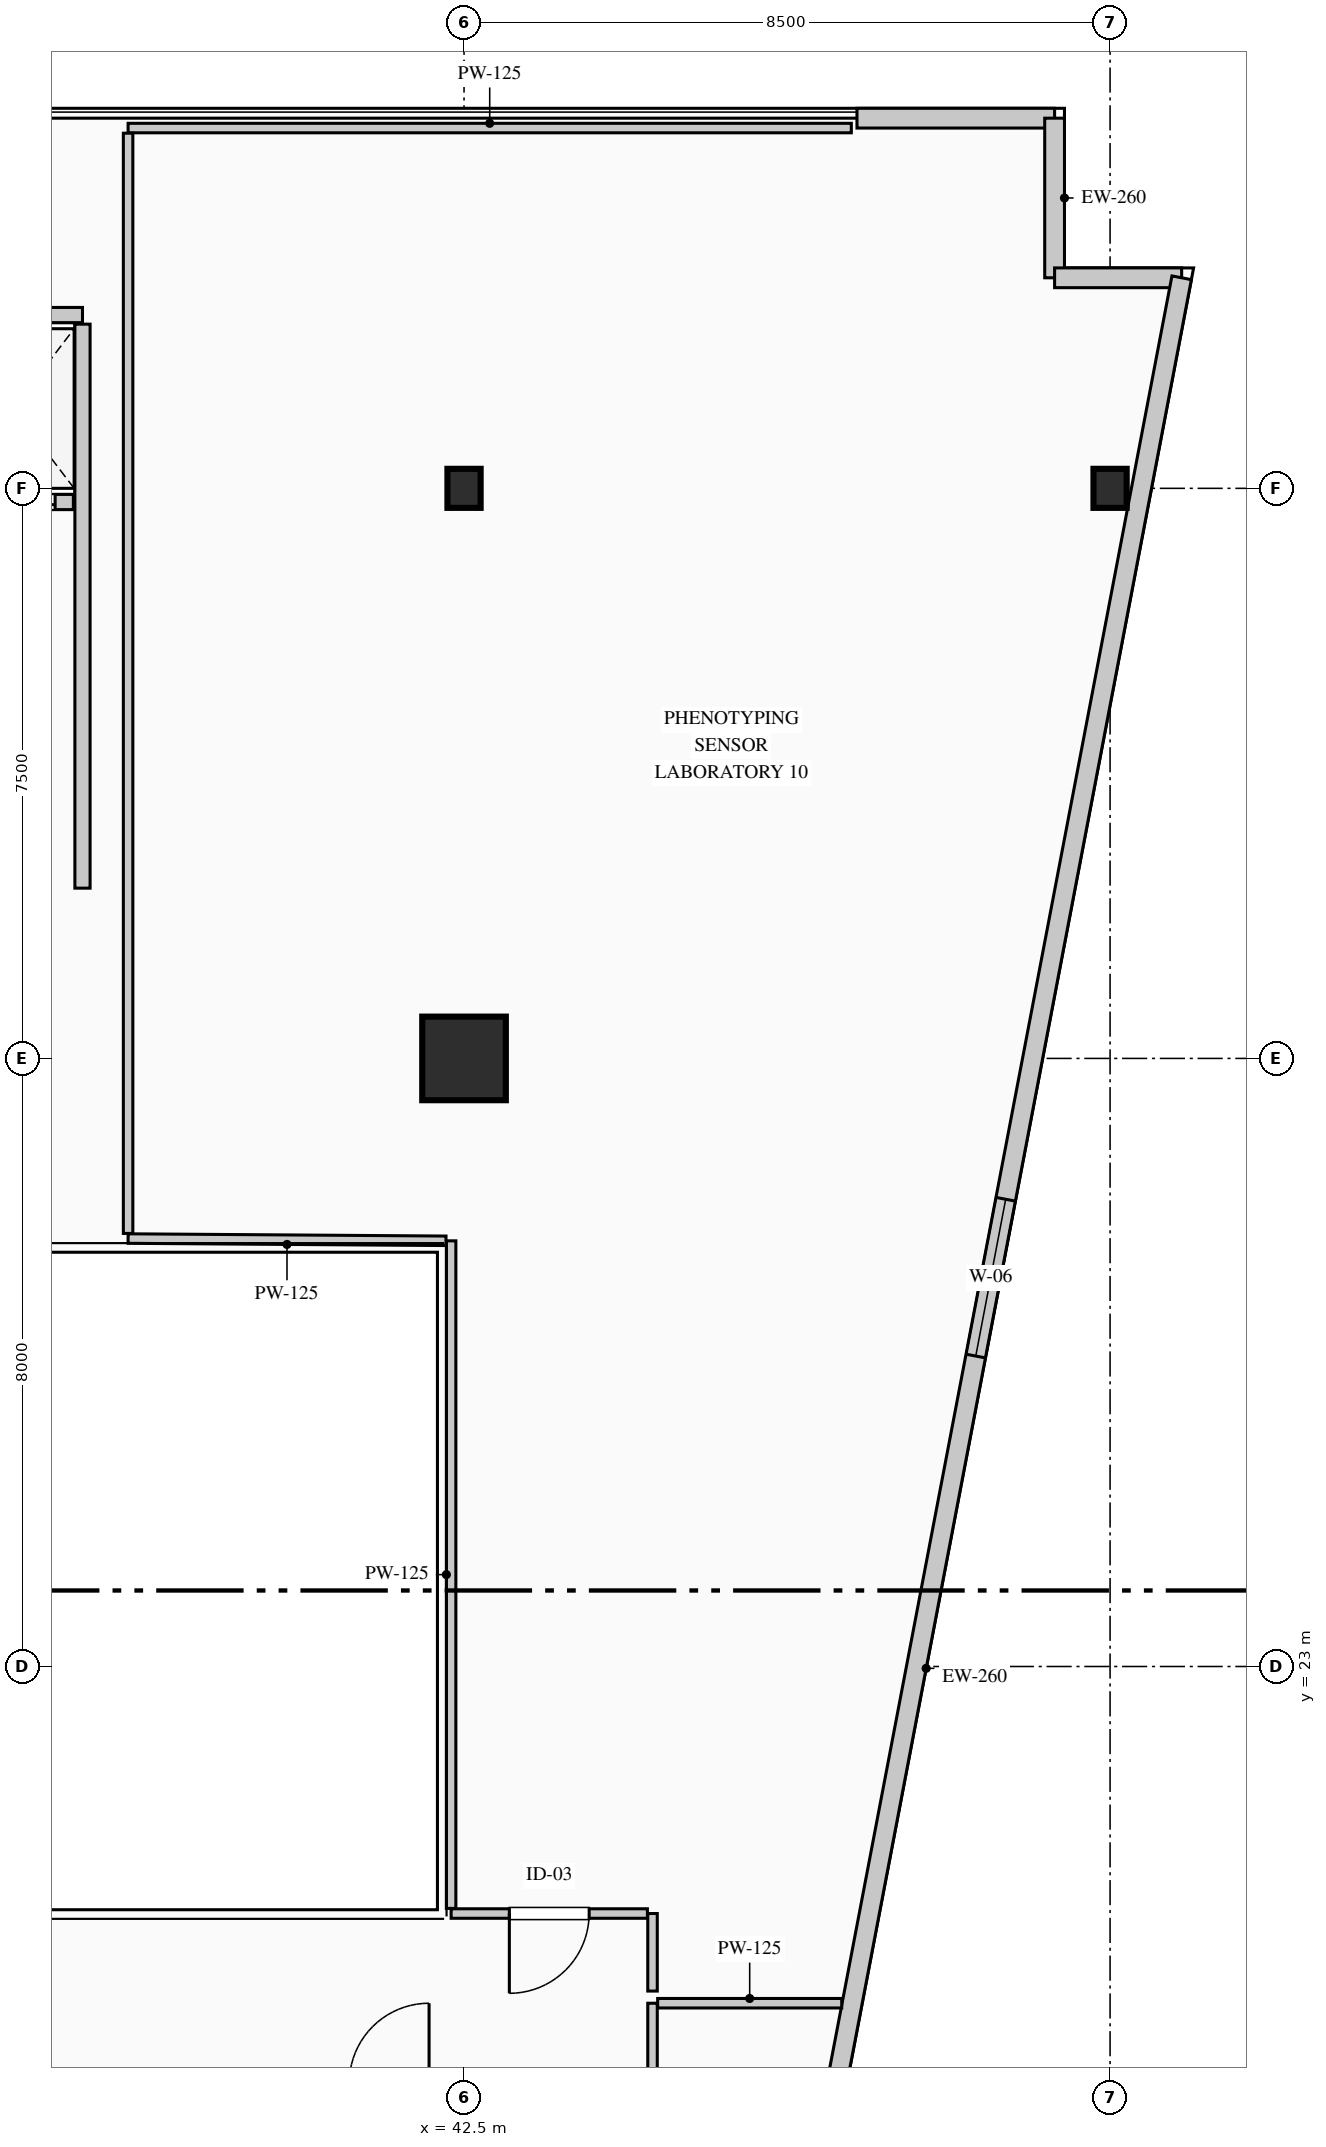
"""IFC4 building model, lengths in metres.
Left out: names, types, materials, properties, quantities, classifications, styles, units other than length and angle.
Written with IfcOpenShell. Run it as: python <this file> out.ifc"""

import sys

from ifc_helpers import new_model, si_unit, direction, frame, frame_2d, origin, origin_2d, place, context, subcontext, project, spatial, rectangle, i_section, extrude, element, fill, save


model = new_model("IFC4")
c1 = context("Model", 3, precision=1e-05, world=origin(), true_north=direction((0.0, 1.0)))
c2 = subcontext(c1, "Body", "Model", "MODEL_VIEW")
j1 = project(units=[si_unit("LENGTHUNIT", "METRE"), si_unit("PLANEANGLEUNIT", "RADIAN")], contexts=[c1])
p1 = place(None, origin())
s1 = spatial("IfcSite", under=j1, at=p1, CompositionType="ELEMENT")
p2 = place(p1, origin())
s2 = spatial("IfcBuilding", under=s1, at=p2, CompositionType="ELEMENT")
p3 = place(p2, frame((0.0, 0.0, 115.35)))
s3 = spatial("IfcBuildingStorey", under=s2, at=p3, CompositionType="ELEMENT", Elevation=115.35)
p4 = place(p3, frame((42.5, 31.0, 0.0), z_axis=(0.0, 0.0, 1.0), x_axis=(1.0, 0.0, 0.0)))
e1 = element("IfcColumn", 1, at=p4, inside=s3, PredefinedType="COLUMN", context=c2, shape_type="SweptSolid", body=[
    extrude(rectangle(XDim=1.1, YDim=1.1, at=origin_2d()), origin(), (0.0, 0.0, 1.0), 3.95),
])
for number, where, z_axis, x_axis in (
    (2, (42.5, 38.5, 0.0), (0.0, 0.0, 1.0), (1.0, 0.0, 0.0)),
    (3, (51.0, 38.5, 0.0), (0.0, 0.0, 1.0), (1.0, 0.0, 0.0)),
):
    element("IfcColumn", number, at=place(p3, frame(where, z_axis=z_axis, x_axis=x_axis)), inside=s3, PredefinedType="COLUMN", context=c2, shape_type="SweptSolid", body=[
        extrude(i_section(OverallWidth=0.437, OverallDepth=0.514, WebThickness=0.061, FlangeThickness=0.077, FilletRadius=0.015, at=origin_2d()), origin(), (0.0, 0.0, 1.0), 3.95),
    ])
p5 = place(p3, frame((47.67, 43.37, 0.0), z_axis=(0.0, 0.0, 1.0), x_axis=(1.0, 0.0, 0.0)))
e4 = element("IfcWall", 4, at=p5, inside=s3, PredefinedType="STANDARD", context=c2, shape_type="SweptSolid", body=[
    extrude(rectangle(XDim=2.6, YDim=0.26, at=frame_2d((1.3, 0.0))), origin(), (0.0, 0.0, 1.0), 3.69),
])
p6 = place(p3, frame((50.27, 43.37, 0.0), z_axis=(0.0, 0.0, 1.0), x_axis=(0.0, -1.0, 0.0)))
e5 = element("IfcWall", 5, at=p6, inside=s3, PredefinedType="STANDARD", context=c2, shape_type="SweptSolid", body=[
    extrude(rectangle(XDim=2.1, YDim=0.26, at=frame_2d((1.05, 0.0))), origin(), (0.0, 0.0, 1.0), 3.69),
])
p7 = place(p3, frame((50.27, 41.27, 0.0), z_axis=(0.0, 0.0, 1.0), x_axis=(1.0, 0.0, 0.0)))
e6 = element("IfcWall", 6, at=p7, inside=s3, PredefinedType="STANDARD", context=c2, shape_type="SweptSolid", body=[
    extrude(rectangle(XDim=1.672, YDim=0.26, at=frame_2d((0.836, 0.0))), origin(), (0.0, 0.0, 1.0), 3.69),
])
p8 = place(p3, frame((51.942, 41.27, 0.0), z_axis=(0.0, 0.0, 1.0), x_axis=(-0.187592192405, -0.982247000173, 0.0)))
e7 = element("IfcWall", 7, at=p8, inside=s3, PredefinedType="STANDARD", context=c2, shape_type="SweptSolid", body=[
    extrude(rectangle(XDim=37.2, YDim=0.26, at=frame_2d((18.6, 0.0))), origin(), (0.0, 0.0, 1.0), 3.69),
])
p9 = place(p8, frame((12.342, 0.0, 0.9)))
e8 = element("IfcOpeningElement", 8, at=p9, cuts=e7, PredefinedType="OPENING", context=c2, shape_type="SweptSolid", body=[
    extrude(rectangle(XDim=2.1, YDim=2.0, at=frame_2d((1.05, 1.0))), frame((0.0, 0.14, 0.0), z_axis=(0.0, -1.0, 0.0), x_axis=(1.0, 0.0, 0.0)), (0.0, 0.0, 1.0), 0.28),
])
p10 = place(p3, frame((30.5, 40.78, 0.0), z_axis=(0.0, 0.0, 1.0), x_axis=(1.0, 0.0, 0.0)))
e9 = element("IfcWall", 9, at=p10, inside=s3, PredefinedType="PARTITIONING", context=c2, shape_type="SweptSolid", body=[
    extrude(rectangle(XDim=6.98, YDim=0.2, at=frame_2d((3.49, 0.0))), origin(), (0.0, 0.0, 1.0), 3.69),
])
p11 = place(p3, frame((37.48, 33.24, 0.0), z_axis=(0.0, 0.0, 1.0), x_axis=(0.0, 1.0, 0.0)))
e10 = element("IfcWall", 10, at=p11, inside=s3, PredefinedType="PARTITIONING", context=c2, shape_type="SweptSolid", body=[
    extrude(rectangle(XDim=7.42, YDim=0.2, at=frame_2d((3.71, 0.0))), origin(), (0.0, 0.0, 1.0), 3.69),
])
p12 = place(p3, frame((30.5, 38.32, 0.0), z_axis=(0.0, 0.0, 1.0), x_axis=(1.0, 0.0, 0.0)))
e11 = element("IfcWall", 11, at=p12, inside=s3, PredefinedType="PARTITIONING", context=c2, shape_type="SweptSolid", body=[
    extrude(rectangle(XDim=6.86, YDim=0.2, at=frame_2d((3.43, 0.0))), origin(), (0.0, 0.0, 1.0), 3.69),
])
p13 = place(p12, frame((0.36, 0.0, 0.0)))
e12 = element("IfcOpeningElement", 12, at=p13, cuts=e11, PredefinedType="OPENING", context=c2, shape_type="SweptSolid", body=[
    extrude(rectangle(XDim=1.1, YDim=2.2, at=frame_2d((0.55, 1.1))), frame((0.0, 0.11, 0.0), z_axis=(0.0, -1.0, 0.0), x_axis=(1.0, 0.0, 0.0)), (0.0, 0.0, 1.0), 0.22),
])
p14 = place(p12, frame((2.08, 0.0, 0.0)))
e13 = element("IfcOpeningElement", 13, at=p14, cuts=e11, PredefinedType="OPENING", context=c2, shape_type="SweptSolid", body=[
    extrude(rectangle(XDim=1.1, YDim=2.2, at=frame_2d((0.55, 1.1))), frame((0.0, 0.11, 0.0), z_axis=(0.0, -1.0, 0.0), x_axis=(1.0, 0.0, 0.0)), (0.0, 0.0, 1.0), 0.22),
])
p15 = place(p12, frame((3.8, 0.0, 0.0)))
e14 = element("IfcOpeningElement", 14, at=p15, cuts=e11, PredefinedType="OPENING", context=c2, shape_type="SweptSolid", body=[
    extrude(rectangle(XDim=1.1, YDim=2.2, at=frame_2d((0.55, 1.1))), frame((0.0, 0.11, 0.0), z_axis=(0.0, -1.0, 0.0), x_axis=(1.0, 0.0, 0.0)), (0.0, 0.0, 1.0), 0.22),
])
p16 = place(p12, frame((5.52, 0.0, 0.0)))
e15 = element("IfcOpeningElement", 15, at=p16, cuts=e11, PredefinedType="OPENING", context=c2, shape_type="SweptSolid", body=[
    extrude(rectangle(XDim=1.1, YDim=2.2, at=frame_2d((0.55, 1.1))), frame((0.0, 0.11, 0.0), z_axis=(0.0, -1.0, 0.0), x_axis=(1.0, 0.0, 0.0)), (0.0, 0.0, 1.0), 0.22),
])
p17 = place(p3, frame((44.98, 17.55, 0.0), z_axis=(0.0, 0.0, 1.0), x_axis=(0.0, 1.0, 0.0)))
e16 = element("IfcWall", 16, at=p17, inside=s3, PredefinedType="PARTITIONING", context=c2, shape_type="SweptSolid", body=[
    extrude(rectangle(XDim=1.02, YDim=0.125, at=frame_2d((0.51, 0.0))), origin(), (0.0, 0.0, 1.0), 3.69),
])
p18 = place(p3, frame((45.048, 18.57, 0.0), z_axis=(0.0, 0.0, 1.0), x_axis=(1.0, 0.0, 0.0)))
e17 = element("IfcWall", 17, at=p18, inside=s3, PredefinedType="PARTITIONING", context=c2, shape_type="SweptSolid", body=[
    extrude(rectangle(XDim=2.422, YDim=0.125, at=frame_2d((1.211, 0.0))), origin(), (0.0, 0.0, 1.0), 3.69),
])
p19 = place(p3, frame((38.08, 43.24, 0.0), z_axis=(0.0, 0.0, 1.0), x_axis=(1.0, 0.0, 0.0)))
e18 = element("IfcWall", 18, at=p19, inside=s3, PredefinedType="PARTITIONING", context=c2, shape_type="SweptSolid", body=[
    extrude(rectangle(XDim=9.515, YDim=0.125, at=frame_2d((4.758, 0.0))), origin(), (0.0, 0.0, 1.0), 3.69),
])
p20 = place(p3, frame((44.98, 18.73, 0.0), z_axis=(0.0, 0.0, 1.0), x_axis=(0.0, 1.0, 0.0)))
e19 = element("IfcWall", 19, at=p20, inside=s3, PredefinedType="PARTITIONING", context=c2, shape_type="SweptSolid", body=[
    extrude(rectangle(XDim=1.02, YDim=0.125, at=frame_2d((0.51, 0.0))), origin(), (0.0, 0.0, 1.0), 3.69),
])
p21 = place(p3, frame((44.913, 19.75, 0.0), z_axis=(0.0, 0.0, 1.0), x_axis=(-1.0, 0.0, 0.0)))
e20 = element("IfcWall", 20, at=p21, inside=s3, PredefinedType="PARTITIONING", context=c2, shape_type="SweptSolid", body=[
    extrude(rectangle(XDim=2.583, YDim=0.125, at=frame_2d((1.291, 0.0))), origin(), (0.0, 0.0, 1.0), 3.69),
])
p22 = place(p21, frame((0.766, 0.0, 0.0)))
e21 = element("IfcOpeningElement", 21, at=p22, cuts=e20, PredefinedType="OPENING", context=c2, shape_type="SweptSolid", body=[
    extrude(rectangle(XDim=1.05, YDim=2.15, at=frame_2d((0.525, 1.075))), frame((0.0, 0.073, 0.0), z_axis=(0.0, -1.0, 0.0), x_axis=(1.0, 0.0, 0.0)), (0.0, 0.0, 1.0), 0.145),
])
p23 = place(p3, frame((42.33, 19.817, 0.0), z_axis=(0.0, 0.0, 1.0), x_axis=(0.0, 1.0, 0.0)))
e22 = element("IfcWall", 22, at=p23, inside=s3, PredefinedType="PARTITIONING", context=c2, shape_type="SweptSolid", body=[
    extrude(rectangle(XDim=8.783, YDim=0.125, at=frame_2d((4.391, 0.0))), origin(), (0.0, 0.0, 1.0), 3.69),
])
p24 = place(p3, frame((42.262, 28.601, 0.0), z_axis=(0.0, 0.0, 1.0), x_axis=(-0.999975466976, 0.007004673168, 0.0)))
e23 = element("IfcWall", 23, at=p24, inside=s3, PredefinedType="PARTITIONING", context=c2, shape_type="SweptSolid", body=[
    extrude(rectangle(XDim=4.182, YDim=0.125, at=frame_2d((2.091, 0.0))), origin(), (0.0, 0.0, 1.0), 3.69),
])
p25 = place(p3, frame((38.08, 28.698, 0.0), z_axis=(0.0, 0.0, 1.0), x_axis=(0.0, 1.0, 0.0)))
e24 = element("IfcWall", 24, at=p25, inside=s3, PredefinedType="PARTITIONING", context=c2, shape_type="SweptSolid", body=[
    extrude(rectangle(XDim=14.475, YDim=0.125, at=frame_2d((7.238, 0.0))), origin(), (0.0, 0.0, 1.0), 3.69),
])
p26 = place(p9, origin())
e25 = element("IfcWindow", 25, at=p26, inside=s3, PartitioningType="DOUBLE_PANEL_VERTICAL", PredefinedType="WINDOW", context=c2, shape_type="SweptSolid", body=[
    extrude(rectangle(XDim=2.1, YDim=2.0, at=frame_2d((1.05, 1.0))), frame((0.0, 0.03, 0.0), z_axis=(0.0, -1.0, 0.0), x_axis=(1.0, 0.0, 0.0)), (0.0, 0.0, 1.0), 0.06),
])
fill(e8, e25)
p27 = place(p16, origin())
e26 = element("IfcDoor", 26, at=p27, inside=s3, OperationType="DOUBLE_DOOR_SLIDING", PredefinedType="DOOR", context=c2, shape_type="SweptSolid", body=[
    extrude(rectangle(XDim=1.1, YDim=2.2, at=frame_2d((0.55, 1.1))), frame((0.0, 0.025, 0.0), z_axis=(0.0, -1.0, 0.0), x_axis=(1.0, 0.0, 0.0)), (0.0, 0.0, 1.0), 0.05),
])
fill(e15, e26)
p28 = place(p22, origin())
e27 = element("IfcDoor", 27, at=p28, inside=s3, OperationType="SINGLE_SWING_RIGHT", PredefinedType="DOOR", context=c2, shape_type="SweptSolid", body=[
    extrude(rectangle(XDim=1.05, YDim=2.15, at=frame_2d((0.525, 1.075))), frame((0.0, 0.025, 0.0), z_axis=(0.0, -1.0, 0.0), x_axis=(1.0, 0.0, 0.0)), (0.0, 0.0, 1.0), 0.05),
])
fill(e21, e27)
save(model, sys.argv[1])
